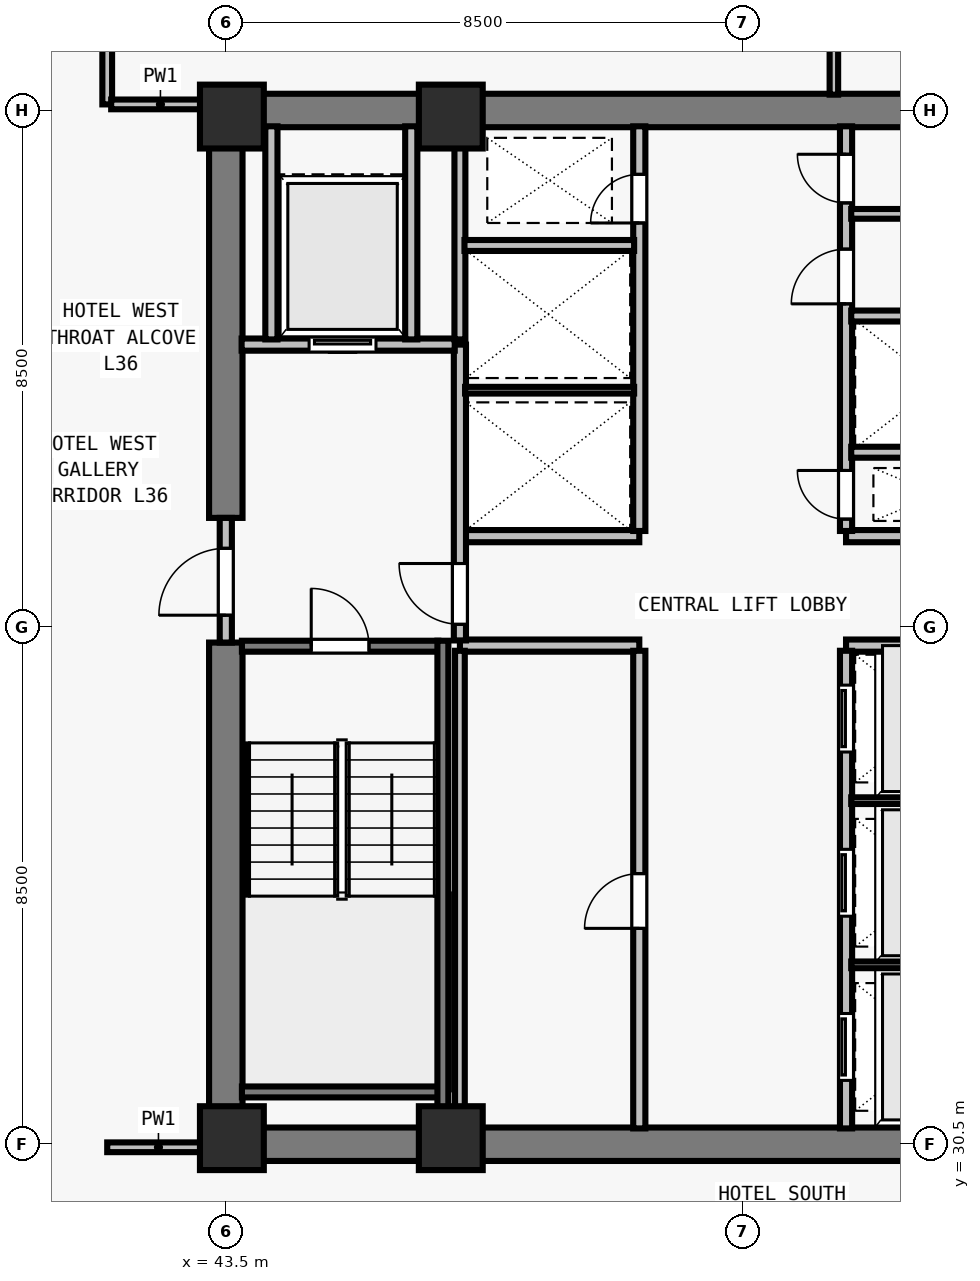
"""IFC4 building model, lengths in metres.
Left out: names, types, materials, properties, quantities, classifications, styles, units other than length and angle.
Written with IfcOpenShell. Run it as: python <this file> out.ifc"""

import sys

from ifc_helpers import new_model, si_unit, direction, frame, frame_2d, origin, origin_2d, place, context, subcontext, project, spatial, rectangle, extrude, element, fill, save


model = new_model("IFC4")
c1 = context("Model", 3, precision=1e-05, world=origin(), true_north=direction((0.0, 1.0)))
c2 = subcontext(c1, "Body", "Model", "MODEL_VIEW")
j1 = project(units=[si_unit("LENGTHUNIT", "METRE"), si_unit("PLANEANGLEUNIT", "RADIAN")], contexts=[c1])
p1 = place(None, origin())
s1 = spatial("IfcSite", under=j1, at=p1, CompositionType="ELEMENT")
p2 = place(p1, origin())
s2 = spatial("IfcBuilding", under=s1, at=p2, CompositionType="ELEMENT")
p3 = place(p2, frame((0.0, 0.0, 134.0)))
s3 = spatial("IfcBuildingStorey", under=s2, at=p3, CompositionType="ELEMENT", Elevation=134.0)
for number, where, z_axis, x_axis in (
    (1, (43.6, 30.6, 0.0), (0.0, 0.0, 1.0), (1.0, 0.0, 0.0)),
    (2, (47.2, 30.6, 0.0), (0.0, 0.0, 1.0), (1.0, 0.0, 0.0)),
    (3, (43.6, 47.4, 0.0), (0.0, 0.0, 1.0), (1.0, 0.0, 0.0)),
    (4, (47.2, 47.4, 0.0), (0.0, 0.0, 1.0), (1.0, 0.0, 0.0)),
):
    element("IfcColumn", number, at=place(p3, frame(where, z_axis=z_axis, x_axis=x_axis)), inside=s3, PredefinedType="COLUMN", context=c2, shape_type="SweptSolid", body=[
        extrude(rectangle(XDim=1.05, YDim=1.05, at=origin_2d()), origin(), (0.0, 0.0, 1.0), 3.5),
    ])
for number, where, z_axis, x_axis in (
    (5, (43.225, 30.5, 0.0), (0.0, 0.0, 1.0), (1.0, 0.0, 0.0)),
    (6, (43.225, 47.5, 0.0), (0.0, 0.0, 1.0), (1.0, 0.0, 0.0)),
):
    element("IfcWall", number, at=place(p3, frame(where, z_axis=z_axis, x_axis=x_axis)), inside=s3, PredefinedType="SHEAR", context=c2, shape_type="SweptSolid", body=[
        extrude(rectangle(XDim=17.55, YDim=0.55, at=frame_2d((8.775, 0.0))), origin(), (0.0, 0.0, 1.0), 3.28),
    ])
p4 = place(p3, frame((43.5, 30.765, 0.0), z_axis=(0.0, 0.0, 1.0), x_axis=(0.0, 1.0, 0.0)))
e7 = element("IfcWall", 7, at=p4, inside=s3, PredefinedType="SHEAR", context=c2, shape_type="SweptSolid", body=[
    extrude(rectangle(XDim=7.985, YDim=0.55, at=frame_2d((3.993, 0.0))), origin(), (0.0, 0.0, 1.0), 3.28),
])
p5 = place(p3, frame((43.5, 40.8, 0.0), z_axis=(0.0, 0.0, 1.0), x_axis=(0.0, 1.0, 0.0)))
e8 = element("IfcWall", 8, at=p5, inside=s3, PredefinedType="SHEAR", context=c2, shape_type="SweptSolid", body=[
    extrude(rectangle(XDim=6.435, YDim=0.55, at=frame_2d((3.218, 0.0))), origin(), (0.0, 0.0, 1.0), 3.28),
])
for number, where, z_axis, x_axis in (
    (9, (47.35, 38.7, 0.0), (0.0, 0.0, 1.0), (1.0, 0.0, 0.0)),
    (10, (47.35, 40.5, 0.0), (0.0, 0.0, 1.0), (1.0, 0.0, 0.0)),
    (11, (53.7, 38.7, 0.0), (0.0, 0.0, 1.0), (1.0, 0.0, 0.0)),
    (12, (53.7, 40.5, 0.0), (0.0, 0.0, 1.0), (1.0, 0.0, 0.0)),
):
    element("IfcWall", number, at=place(p3, frame(where, z_axis=z_axis, x_axis=x_axis)), inside=s3, PredefinedType="SOLIDWALL", context=c2, shape_type="SweptSolid", body=[
        extrude(rectangle(XDim=2.95, YDim=0.2, at=frame_2d((1.475, 0.0))), origin(), (0.0, 0.0, 1.0), 3.28),
    ])
p6 = place(p3, frame((50.3, 30.76, 0.0), z_axis=(0.0, 0.0, 1.0), x_axis=(0.0, 1.0, 0.0)))
e13 = element("IfcWall", 13, at=p6, inside=s3, PredefinedType="SOLIDWALL", context=c2, shape_type="SweptSolid", body=[
    extrude(rectangle(XDim=7.855, YDim=0.2, at=frame_2d((3.927, 0.0))), origin(), (0.0, 0.0, 1.0), 3.28),
])
p7 = place(p6, frame((3.29, 0.0, 0.0)))
e14 = element("IfcOpeningElement", 14, at=p7, cuts=e13, PredefinedType="OPENING", context=c2, shape_type="SweptSolid", body=[
    extrude(rectangle(XDim=0.9, YDim=2.12, at=frame_2d((0.45, 1.06))), frame((0.0, 0.11, 0.0), z_axis=(0.0, -1.0, 0.0), x_axis=(1.0, 0.0, 0.0)), (0.0, 0.0, 1.0), 0.22),
])
p8 = place(p3, frame((53.7, 30.76, 0.0), z_axis=(0.0, 0.0, 1.0), x_axis=(0.0, 1.0, 0.0)))
e15 = element("IfcWall", 15, at=p8, inside=s3, PredefinedType="SOLIDWALL", context=c2, shape_type="SweptSolid", body=[
    extrude(rectangle(XDim=7.855, YDim=0.2, at=frame_2d((3.927, 0.0))), origin(), (0.0, 0.0, 1.0), 3.28),
])
p9 = place(p8, frame((0.79, 0.0, 0.0)))
e16 = element("IfcOpeningElement", 16, at=p9, cuts=e15, PredefinedType="OPENING", context=c2, shape_type="SweptSolid", body=[
    extrude(rectangle(XDim=1.1, YDim=2.2, at=frame_2d((0.55, 1.1))), frame((0.0, 0.11, 0.0), z_axis=(0.0, -1.0, 0.0), x_axis=(1.0, 0.0, 0.0)), (0.0, 0.0, 1.0), 0.22),
])
p10 = place(p8, frame((3.49, 0.0, 0.0)))
e17 = element("IfcOpeningElement", 17, at=p10, cuts=e15, PredefinedType="OPENING", context=c2, shape_type="SweptSolid", body=[
    extrude(rectangle(XDim=1.1, YDim=2.2, at=frame_2d((0.55, 1.1))), frame((0.0, 0.11, 0.0), z_axis=(0.0, -1.0, 0.0), x_axis=(1.0, 0.0, 0.0)), (0.0, 0.0, 1.0), 0.22),
])
p11 = place(p8, frame((6.19, 0.0, 0.0)))
e18 = element("IfcOpeningElement", 18, at=p11, cuts=e15, PredefinedType="OPENING", context=c2, shape_type="SweptSolid", body=[
    extrude(rectangle(XDim=1.1, YDim=2.2, at=frame_2d((0.55, 1.1))), frame((0.0, 0.11, 0.0), z_axis=(0.0, -1.0, 0.0), x_axis=(1.0, 0.0, 0.0)), (0.0, 0.0, 1.0), 0.22),
])
p12 = place(p3, frame((50.3, 40.585, 0.0), z_axis=(0.0, 0.0, 1.0), x_axis=(0.0, 1.0, 0.0)))
e19 = element("IfcWall", 19, at=p12, inside=s3, PredefinedType="SOLIDWALL", context=c2, shape_type="SweptSolid", body=[
    extrude(rectangle(XDim=6.655, YDim=0.2, at=frame_2d((3.328, 0.0))), origin(), (0.0, 0.0, 1.0), 3.28),
])
p13 = place(p12, frame((5.065, 0.0, 0.0)))
e20 = element("IfcOpeningElement", 20, at=p13, cuts=e19, PredefinedType="OPENING", context=c2, shape_type="SweptSolid", body=[
    extrude(rectangle(XDim=0.8, YDim=2.08, at=frame_2d((0.4, 1.04))), frame((0.0, 0.11, 0.0), z_axis=(0.0, -1.0, 0.0), x_axis=(1.0, 0.0, 0.0)), (0.0, 0.0, 1.0), 0.22),
])
p14 = place(p3, frame((53.7, 40.585, 0.0), z_axis=(0.0, 0.0, 1.0), x_axis=(0.0, 1.0, 0.0)))
e21 = element("IfcWall", 21, at=p14, inside=s3, PredefinedType="SOLIDWALL", context=c2, shape_type="SweptSolid", body=[
    extrude(rectangle(XDim=6.655, YDim=0.2, at=frame_2d((3.328, 0.0))), origin(), (0.0, 0.0, 1.0), 3.28),
])
p15 = place(p14, frame((0.195, 0.0, 0.0)))
e22 = element("IfcOpeningElement", 22, at=p15, cuts=e21, PredefinedType="OPENING", context=c2, shape_type="SweptSolid", body=[
    extrude(rectangle(XDim=0.8, YDim=2.08, at=frame_2d((0.4, 1.04))), frame((0.0, 0.11, 0.0), z_axis=(0.0, -1.0, 0.0), x_axis=(1.0, 0.0, 0.0)), (0.0, 0.0, 1.0), 0.22),
])
p16 = place(p14, frame((3.735, 0.0, 0.0)))
e23 = element("IfcOpeningElement", 23, at=p16, cuts=e21, PredefinedType="OPENING", context=c2, shape_type="SweptSolid", body=[
    extrude(rectangle(XDim=0.9, YDim=2.12, at=frame_2d((0.45, 1.06))), frame((0.0, 0.11, 0.0), z_axis=(0.0, -1.0, 0.0), x_axis=(1.0, 0.0, 0.0)), (0.0, 0.0, 1.0), 0.22),
])
p17 = place(p14, frame((5.395, 0.0, 0.0)))
e24 = element("IfcOpeningElement", 24, at=p17, cuts=e21, PredefinedType="OPENING", context=c2, shape_type="SweptSolid", body=[
    extrude(rectangle(XDim=0.8, YDim=2.1, at=frame_2d((0.4, 1.05))), frame((0.0, 0.11, 0.0), z_axis=(0.0, -1.0, 0.0), x_axis=(1.0, 0.0, 0.0)), (0.0, 0.0, 1.0), 0.22),
])
p18 = place(p3, frame((43.5, 38.75, 0.0), z_axis=(0.0, 0.0, 1.0), x_axis=(0.0, 1.0, 0.0)))
e25 = element("IfcWall", 25, at=p18, inside=s3, PredefinedType="SOLIDWALL", context=c2, shape_type="SweptSolid", body=[
    extrude(rectangle(XDim=2.05, YDim=0.2, at=frame_2d((1.025, 0.0))), origin(), (0.0, 0.0, 1.0), 3.28),
])
p19 = place(p18, frame((0.45, 0.0, 0.0)))
e26 = element("IfcOpeningElement", 26, at=p19, cuts=e25, PredefinedType="OPENING", context=c2, shape_type="SweptSolid", body=[
    extrude(rectangle(XDim=1.1, YDim=2.15, at=frame_2d((0.55, 1.075))), frame((0.0, 0.11, 0.0), z_axis=(0.0, -1.0, 0.0), x_axis=(1.0, 0.0, 0.0)), (0.0, 0.0, 1.0), 0.22),
])
p20 = place(p3, frame((47.35, 38.785, 0.0), z_axis=(0.0, 0.0, 1.0), x_axis=(0.0, 1.0, 0.0)))
e27 = element("IfcWall", 27, at=p20, inside=s3, PredefinedType="SOLIDWALL", context=c2, shape_type="SweptSolid", body=[
    extrude(rectangle(XDim=4.865, YDim=0.2, at=frame_2d((2.433, 0.0))), origin(), (0.0, 0.0, 1.0), 3.28),
])
p21 = place(p20, frame((0.265, 0.0, 0.0)))
e28 = element("IfcOpeningElement", 28, at=p21, cuts=e27, PredefinedType="OPENING", context=c2, shape_type="SweptSolid", body=[
    extrude(rectangle(XDim=1.0, YDim=2.15, at=frame_2d((0.5, 1.075))), frame((0.0, 0.11, 0.0), z_axis=(0.0, -1.0, 0.0), x_axis=(1.0, 0.0, 0.0)), (0.0, 0.0, 1.0), 0.22),
])
p22 = place(p3, frame((43.76, 43.65, 0.0), z_axis=(0.0, 0.0, 1.0), x_axis=(1.0, 0.0, 0.0)))
e29 = element("IfcWall", 29, at=p22, inside=s3, PredefinedType="SOLIDWALL", context=c2, shape_type="SweptSolid", body=[
    extrude(rectangle(XDim=3.505, YDim=0.2, at=frame_2d((1.752, 0.0))), origin(), (0.0, 0.0, 1.0), 3.28),
])
p23 = place(p22, frame((1.11, 0.0, 0.0)))
e30 = element("IfcOpeningElement", 30, at=p23, cuts=e29, PredefinedType="OPENING", context=c2, shape_type="SweptSolid", body=[
    extrude(rectangle(XDim=1.1, YDim=2.2, at=frame_2d((0.55, 1.1))), frame((0.0, 0.11, 0.0), z_axis=(0.0, -1.0, 0.0), x_axis=(1.0, 0.0, 0.0)), (0.0, 0.0, 1.0), 0.22),
])
for number, where, z_axis, x_axis in (
    (31, (46.55, 43.735, 0.0), (0.0, 0.0, 1.0), (0.0, 1.0, 0.0)),
    (32, (44.25, 43.735, 0.0), (0.0, 0.0, 1.0), (0.0, 1.0, 0.0)),
):
    element("IfcWall", number, at=place(p3, frame(where, z_axis=z_axis, x_axis=x_axis)), inside=s3, PredefinedType="SOLIDWALL", context=c2, shape_type="SweptSolid", body=[
        extrude(rectangle(XDim=3.505, YDim=0.2, at=frame_2d((1.752, 0.0))), origin(), (0.0, 0.0, 1.0), 3.28),
    ])
p24 = place(p3, frame((47.35, 30.76, 0.0), z_axis=(0.0, 0.0, 1.0), x_axis=(0.0, 1.0, 0.0)))
e33 = element("IfcWall", 33, at=p24, inside=s3, PredefinedType="PARTITIONING", context=c2, shape_type="SweptSolid", body=[
    extrude(rectangle(XDim=7.855, YDim=0.16, at=frame_2d((3.927, 0.0))), origin(), (0.0, 0.0, 1.0), 3.28),
])
for number, where, z_axis, x_axis in (
    (34, (53.785, 33.45, 0.0), (0.0, 0.0, 1.0), (1.0, 0.0, 0.0)),
    (35, (53.785, 36.15, 0.0), (0.0, 0.0, 1.0), (1.0, 0.0, 0.0)),
):
    element("IfcWall", number, at=place(p3, frame(where, z_axis=z_axis, x_axis=x_axis)), inside=s3, PredefinedType="PARTITIONING", context=c2, shape_type="SweptSolid", body=[
        extrude(rectangle(XDim=2.79, YDim=0.11, at=frame_2d((1.395, 0.0))), origin(), (0.0, 0.0, 1.0), 3.28),
    ])
p25 = place(p3, frame((47.35, 43.735, 0.0), z_axis=(0.0, 0.0, 1.0), x_axis=(0.0, 1.0, 0.0)))
e36 = element("IfcWall", 36, at=p25, inside=s3, PredefinedType="SOLIDWALL", context=c2, shape_type="SweptSolid", body=[
    extrude(rectangle(XDim=3.505, YDim=0.18, at=frame_2d((1.752, 0.0))), origin(), (0.0, 0.0, 1.0), 3.28),
])
p26 = place(p3, frame((47.435, 42.9, 0.0), z_axis=(0.0, 0.0, 1.0), x_axis=(1.0, 0.0, 0.0)))
e37 = element("IfcWall", 37, at=p26, inside=s3, PredefinedType="PARTITIONING", context=c2, shape_type="SweptSolid", body=[
    extrude(rectangle(XDim=2.78, YDim=0.11, at=frame_2d((1.39, 0.0))), origin(), (0.0, 0.0, 1.0), 3.28),
])
p27 = place(p3, frame((47.425, 45.28, 0.0), z_axis=(0.0, 0.0, 1.0), x_axis=(1.0, 0.0, 0.0)))
e38 = element("IfcWall", 38, at=p27, inside=s3, PredefinedType="SOLIDWALL", context=c2, shape_type="SweptSolid", body=[
    extrude(rectangle(XDim=2.79, YDim=0.18, at=frame_2d((1.395, 0.0))), origin(), (0.0, 0.0, 1.0), 3.28),
])
p28 = place(p3, frame((53.785, 41.88, 0.0), z_axis=(0.0, 0.0, 1.0), x_axis=(1.0, 0.0, 0.0)))
e39 = element("IfcWall", 39, at=p28, inside=s3, PredefinedType="SOLIDWALL", context=c2, shape_type="SweptSolid", body=[
    extrude(rectangle(XDim=2.78, YDim=0.18, at=frame_2d((1.39, 0.0))), origin(), (0.0, 0.0, 1.0), 3.28),
])
p29 = place(p3, frame((53.785, 44.12, 0.0), z_axis=(0.0, 0.0, 1.0), x_axis=(1.0, 0.0, 0.0)))
e40 = element("IfcWall", 40, at=p29, inside=s3, PredefinedType="SOLIDWALL", context=c2, shape_type="SweptSolid", body=[
    extrude(rectangle(XDim=2.79, YDim=0.18, at=frame_2d((1.395, 0.0))), origin(), (0.0, 0.0, 1.0), 3.28),
])
p30 = place(p3, frame((53.785, 45.8, 0.0), z_axis=(0.0, 0.0, 1.0), x_axis=(1.0, 0.0, 0.0)))
e41 = element("IfcWall", 41, at=p30, inside=s3, PredefinedType="PARTITIONING", context=c2, shape_type="SweptSolid", body=[
    extrude(rectangle(XDim=2.79, YDim=0.16, at=frame_2d((1.395, 0.0))), origin(), (0.0, 0.0, 1.0), 3.28),
])
p31 = place(p3, frame((41.55, 47.6, 0.0), z_axis=(0.0, 0.0, 1.0), x_axis=(0.0, 1.0, 0.0)))
e42 = element("IfcWall", 42, at=p31, inside=s3, PredefinedType="PARTITIONING", context=c2, shape_type="SweptSolid", body=[
    extrude(rectangle(XDim=15.075, YDim=0.16, at=frame_2d((7.538, 0.0))), origin(), (0.0, 0.0, 1.0), 2.555),
])
p32 = place(p31, frame((3.5, 0.0, 0.0)))
e43 = element("IfcOpeningElement", 43, at=p32, cuts=e42, PredefinedType="OPENING", context=c2, shape_type="SweptSolid", body=[
    extrude(rectangle(XDim=0.96, YDim=2.12, at=frame_2d((0.48, 1.06))), frame((0.0, 0.09, 0.0), z_axis=(0.0, -1.0, 0.0), x_axis=(1.0, 0.0, 0.0)), (0.0, 0.0, 1.0), 0.18),
])
p33 = place(p3, frame((41.55, 30.45, 0.0), z_axis=(0.0, 0.0, 1.0), x_axis=(1.0, 0.0, 0.0)))
e44 = element("IfcWall", 44, at=p33, inside=s3, PredefinedType="PARTITIONING", context=c2, shape_type="SweptSolid", body=[
    extrude(rectangle(XDim=1.685, YDim=0.16, at=frame_2d((0.843, 0.0))), origin(), (0.0, 0.0, 1.0), 3.28),
])
p34 = place(p3, frame((41.615, 47.6, 0.0), z_axis=(0.0, 0.0, 1.0), x_axis=(1.0, 0.0, 0.0)))
e45 = element("IfcWall", 45, at=p34, inside=s3, PredefinedType="PARTITIONING", context=c2, shape_type="SweptSolid", body=[
    extrude(rectangle(XDim=1.62, YDim=0.16, at=frame_2d((0.81, 0.0))), origin(), (0.0, 0.0, 1.0), 3.28),
])
p35 = place(p3, frame((53.5, 47.76, 0.0), z_axis=(0.0, 0.0, 1.0), x_axis=(0.0, 1.0, 0.0)))
e46 = element("IfcWall", 46, at=p35, inside=s3, PredefinedType="PARTITIONING", context=c2, shape_type="SweptSolid", body=[
    extrude(rectangle(XDim=14.915, YDim=0.14, at=frame_2d((7.458, 0.0))), origin(), (0.0, 0.0, 1.0), 2.896),
])
p36 = place(p3, frame((43.765, 38.69, 0.0), z_axis=(0.0, 0.0, 1.0), x_axis=(1.0, 0.0, 0.0)))
e47 = element("IfcWall", 47, at=p36, inside=s3, PredefinedType="SOLIDWALL", context=c2, shape_type="SweptSolid", body=[
    extrude(rectangle(XDim=3.23, YDim=0.18, at=frame_2d((1.615, 0.0))), origin(), (0.0, 0.0, 1.0), 3.28),
])
p37 = place(p36, frame((1.14, 0.0, 0.0)))
e48 = element("IfcOpeningElement", 48, at=p37, cuts=e47, PredefinedType="OPENING", context=c2, shape_type="SweptSolid", body=[
    extrude(rectangle(XDim=0.95, YDim=2.15, at=frame_2d((0.475, 1.075))), frame((0.0, 0.1, 0.0), z_axis=(0.0, -1.0, 0.0), x_axis=(1.0, 0.0, 0.0)), (0.0, 0.0, 1.0), 0.2),
])
p38 = place(p3, frame((43.765, 31.36, 0.0), z_axis=(0.0, 0.0, 1.0), x_axis=(1.0, 0.0, 0.0)))
e49 = element("IfcWall", 49, at=p38, inside=s3, PredefinedType="SOLIDWALL", context=c2, shape_type="SweptSolid", body=[
    extrude(rectangle(XDim=3.23, YDim=0.18, at=frame_2d((1.615, 0.0))), origin(), (0.0, 0.0, 1.0), 3.28),
])
p39 = place(p3, frame((47.07, 38.78, 0.0), z_axis=(0.0, 0.0, 1.0), x_axis=(0.0, -1.0, 0.0)))
e50 = element("IfcWall", 50, at=p39, inside=s3, PredefinedType="SOLIDWALL", context=c2, shape_type="SweptSolid", body=[
    extrude(rectangle(XDim=8.017, YDim=0.18, at=frame_2d((4.009, 0.0))), origin(), (0.0, 0.0, 1.0), 3.28),
])
p40 = place(p19, origin())
e51 = element("IfcDoor", 51, at=p40, inside=s3, OperationType="SINGLE_SWING_LEFT", PredefinedType="DOOR", context=c2, shape_type="SweptSolid", body=[
    extrude(rectangle(XDim=1.1, YDim=2.15, at=frame_2d((0.55, 1.075))), frame((0.0, 0.025, 0.0), z_axis=(0.0, -1.0, 0.0), x_axis=(1.0, 0.0, 0.0)), (0.0, 0.0, 1.0), 0.05),
])
fill(e26, e51)
p41 = place(p21, origin())
e52 = element("IfcDoor", 52, at=p41, inside=s3, OperationType="SINGLE_SWING_RIGHT", PredefinedType="DOOR", context=c2, shape_type="SweptSolid", body=[
    extrude(rectangle(XDim=1.0, YDim=2.15, at=frame_2d((0.5, 1.075))), frame((0.0, 0.025, 0.0), z_axis=(0.0, -1.0, 0.0), x_axis=(1.0, 0.0, 0.0)), (0.0, 0.0, 1.0), 0.05),
])
fill(e28, e52)
p42 = place(p23, origin())
e53 = element("IfcDoor", 53, at=p42, inside=s3, OperationType="SLIDING_TO_LEFT", PredefinedType="DOOR", context=c2, shape_type="SweptSolid", body=[
    extrude(rectangle(XDim=1.1, YDim=2.2, at=frame_2d((0.55, 1.1))), frame((0.0, 0.025, 0.0), z_axis=(0.0, -1.0, 0.0), x_axis=(1.0, 0.0, 0.0)), (0.0, 0.0, 1.0), 0.05),
])
fill(e30, e53)
p43 = place(p7, origin())
e54 = element("IfcDoor", 54, at=p43, inside=s3, OperationType="SINGLE_SWING_LEFT", PredefinedType="DOOR", context=c2, shape_type="SweptSolid", body=[
    extrude(rectangle(XDim=0.9, YDim=2.12, at=frame_2d((0.45, 1.06))), frame((0.0, 0.025, 0.0), z_axis=(0.0, -1.0, 0.0), x_axis=(1.0, 0.0, 0.0)), (0.0, 0.0, 1.0), 0.05),
])
fill(e14, e54)
p44 = place(p9, origin())
e55 = element("IfcDoor", 55, at=p44, inside=s3, OperationType="SLIDING_TO_LEFT", PredefinedType="DOOR", context=c2, shape_type="SweptSolid", body=[
    extrude(rectangle(XDim=1.1, YDim=2.2, at=frame_2d((0.55, 1.1))), frame((0.0, 0.025, 0.0), z_axis=(0.0, -1.0, 0.0), x_axis=(1.0, 0.0, 0.0)), (0.0, 0.0, 1.0), 0.05),
])
fill(e16, e55)
p45 = place(p10, origin())
e56 = element("IfcDoor", 56, at=p45, inside=s3, OperationType="SLIDING_TO_LEFT", PredefinedType="DOOR", context=c2, shape_type="SweptSolid", body=[
    extrude(rectangle(XDim=1.1, YDim=2.2, at=frame_2d((0.55, 1.1))), frame((0.0, 0.025, 0.0), z_axis=(0.0, -1.0, 0.0), x_axis=(1.0, 0.0, 0.0)), (0.0, 0.0, 1.0), 0.05),
])
fill(e17, e56)
p46 = place(p11, origin())
e57 = element("IfcDoor", 57, at=p46, inside=s3, OperationType="SLIDING_TO_LEFT", PredefinedType="DOOR", context=c2, shape_type="SweptSolid", body=[
    extrude(rectangle(XDim=1.1, YDim=2.2, at=frame_2d((0.55, 1.1))), frame((0.0, 0.025, 0.0), z_axis=(0.0, -1.0, 0.0), x_axis=(1.0, 0.0, 0.0)), (0.0, 0.0, 1.0), 0.05),
])
fill(e18, e57)
p47 = place(p13, origin())
e58 = element("IfcDoor", 58, at=p47, inside=s3, OperationType="SINGLE_SWING_LEFT", PredefinedType="DOOR", context=c2, shape_type="SweptSolid", body=[
    extrude(rectangle(XDim=0.8, YDim=2.08, at=frame_2d((0.4, 1.04))), frame((0.0, 0.025, 0.0), z_axis=(0.0, -1.0, 0.0), x_axis=(1.0, 0.0, 0.0)), (0.0, 0.0, 1.0), 0.05),
])
fill(e20, e58)
p48 = place(p15, origin())
e59 = element("IfcDoor", 59, at=p48, inside=s3, OperationType="SINGLE_SWING_RIGHT", PredefinedType="DOOR", context=c2, shape_type="SweptSolid", body=[
    extrude(rectangle(XDim=0.8, YDim=2.08, at=frame_2d((0.4, 1.04))), frame((0.0, 0.025, 0.0), z_axis=(0.0, -1.0, 0.0), x_axis=(1.0, 0.0, 0.0)), (0.0, 0.0, 1.0), 0.05),
])
fill(e22, e59)
p49 = place(p16, origin())
e60 = element("IfcDoor", 60, at=p49, inside=s3, OperationType="SINGLE_SWING_LEFT", PredefinedType="DOOR", context=c2, shape_type="SweptSolid", body=[
    extrude(rectangle(XDim=0.9, YDim=2.12, at=frame_2d((0.45, 1.06))), frame((0.0, 0.025, 0.0), z_axis=(0.0, -1.0, 0.0), x_axis=(1.0, 0.0, 0.0)), (0.0, 0.0, 1.0), 0.05),
])
fill(e23, e60)
p50 = place(p17, origin())
e61 = element("IfcDoor", 61, at=p50, inside=s3, OperationType="SINGLE_SWING_RIGHT", PredefinedType="DOOR", context=c2, shape_type="SweptSolid", body=[
    extrude(rectangle(XDim=0.8, YDim=2.1, at=frame_2d((0.4, 1.05))), frame((0.0, 0.025, 0.0), z_axis=(0.0, -1.0, 0.0), x_axis=(1.0, 0.0, 0.0)), (0.0, 0.0, 1.0), 0.05),
])
fill(e24, e61)
p51 = place(p37, origin())
e62 = element("IfcDoor", 62, at=p51, inside=s3, OperationType="SINGLE_SWING_LEFT", PredefinedType="DOOR", context=c2, shape_type="SweptSolid", body=[
    extrude(rectangle(XDim=0.95, YDim=2.15, at=frame_2d((0.475, 1.075))), frame((0.0, 0.025, 0.0), z_axis=(0.0, -1.0, 0.0), x_axis=(1.0, 0.0, 0.0)), (0.0, 0.0, 1.0), 0.05),
])
fill(e48, e62)
save(model, sys.argv[1])
